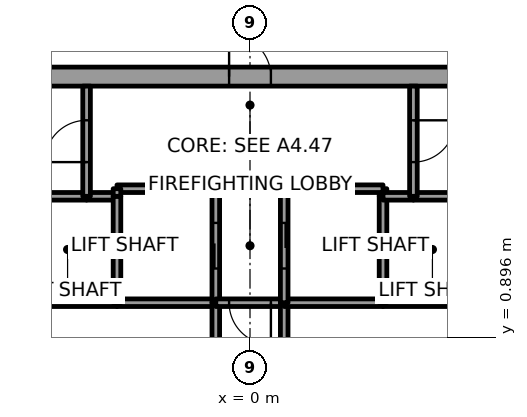
"""IFC4 building model, lengths in metres.
Left out: names, types, materials, properties, quantities, classifications, styles, units other than length and angle.
Written with IfcOpenShell. Run it as: python <this file> out.ifc"""

import sys

from ifc_helpers import new_model, si_unit, direction, frame, frame_2d, origin, place, context, subcontext, project, spatial, rectangle, extrude, element, fill, save


model = new_model("IFC4")
c1 = context("Model", 3, precision=1e-05, world=origin(), true_north=direction((0.0, 1.0)))
c2 = subcontext(c1, "Body", "Model", "MODEL_VIEW")
j1 = project(units=[si_unit("LENGTHUNIT", "METRE"), si_unit("PLANEANGLEUNIT", "RADIAN")], contexts=[c1])
p1 = place(None, origin())
s1 = spatial("IfcSite", under=j1, at=p1, CompositionType="ELEMENT")
p2 = place(p1, origin())
s2 = spatial("IfcBuilding", under=s1, at=p2, CompositionType="ELEMENT")
p3 = place(p2, frame((0.0, 0.0, 201.8)))
s3 = spatial("IfcBuildingStorey", under=s2, at=p3, CompositionType="ELEMENT", Elevation=201.8)
p4 = place(p3, frame((-11.0, 7.75, 0.0), z_axis=(0.0, 0.0, 1.0), x_axis=(1.0, 0.0, 0.0)))
e1 = element("IfcWall", 1, at=p4, inside=s3, PredefinedType="SHEAR", context=c2, shape_type="SweptSolid", body=[
    extrude(rectangle(XDim=22.0, YDim=0.5, at=frame_2d((11.0, 0.0))), origin(), (0.0, 0.0, 1.0), 4.0),
])
p5 = place(p4, frame((10.45, 0.0, 0.0)))
e2 = element("IfcOpeningElement", 2, at=p5, cuts=e1, PredefinedType="OPENING", context=c2, shape_type="SweptSolid", body=[
    extrude(rectangle(XDim=1.1, YDim=2.1, at=frame_2d((0.55, 1.05))), frame((0.0, 0.25, 0.0), z_axis=(0.0, -1.0, 0.0), x_axis=(1.0, 0.0, 0.0)), (0.0, 0.0, 1.0), 0.5),
])
p6 = place(p3, frame((-3.5, 1.8, 0.0), z_axis=(0.0, 0.0, 1.0), x_axis=(-1.0, 0.0, 0.0)))
e3 = element("IfcWall", 3, at=p6, inside=s3, PredefinedType="SOLIDWALL", context=c2, shape_type="SweptSolid", body=[
    extrude(rectangle(XDim=2.6, YDim=0.2, at=frame_2d((1.3, 0.0))), origin(), (0.0, 0.0, 1.0), 3.85),
])
p7 = place(p3, frame((-4.3, 4.6, 0.0), z_axis=(0.0, 0.0, 1.0), x_axis=(-1.0, 0.0, 0.0)))
e4 = element("IfcWall", 4, at=p7, inside=s3, PredefinedType="SOLIDWALL", context=c2, shape_type="SweptSolid", body=[
    extrude(rectangle(XDim=1.8, YDim=0.2, at=frame_2d((0.9, 0.0))), origin(), (0.0, 0.0, 1.0), 3.85),
])
p8 = place(p3, frame((-3.5, 4.6, 0.0), z_axis=(0.0, 0.0, 1.0), x_axis=(-1.0, 0.0, 0.0)))
e5 = element("IfcWall", 5, at=p8, inside=s3, PredefinedType="SOLIDWALL", context=c2, shape_type="SweptSolid", body=[
    extrude(rectangle(XDim=0.8, YDim=0.2, at=frame_2d((0.4, 0.0))), origin(), (0.0, 0.0, 1.0), 3.85),
])
p9 = place(p3, frame((-4.3, 4.6, 0.0), z_axis=(0.0, 0.0, 1.0), x_axis=(0.0, 1.0, 0.0)))
e6 = element("IfcWall", 6, at=p9, inside=s3, PredefinedType="SOLIDWALL", context=c2, shape_type="SweptSolid", body=[
    extrude(rectangle(XDim=2.9, YDim=0.2, at=frame_2d((1.45, 0.0))), origin(), (0.0, 0.0, 1.0), 3.85),
])
p10 = place(p9, frame((0.9, 0.0, 0.0)))
e7 = element("IfcOpeningElement", 7, at=p10, cuts=e6, PredefinedType="OPENING", context=c2, shape_type="SweptSolid", body=[
    extrude(rectangle(XDim=1.1, YDim=2.1, at=frame_2d((0.55, 1.05))), frame((0.0, 0.1, 0.0), z_axis=(0.0, -1.0, 0.0), x_axis=(1.0, 0.0, 0.0)), (0.0, 0.0, 1.0), 0.2),
])
p11 = place(p3, frame((-0.9, 1.8, 0.0), z_axis=(0.0, 0.0, 1.0), x_axis=(-1.0, 0.0, 0.0)))
e8 = element("IfcWall", 8, at=p11, inside=s3, PredefinedType="SOLIDWALL", context=c2, shape_type="SweptSolid", body=[
    extrude(rectangle(XDim=2.6, YDim=0.2, at=frame_2d((1.3, 0.0))), origin(), (0.0, 0.0, 1.0), 3.85),
])
p12 = place(p3, frame((-3.5, 4.6, 0.0), z_axis=(0.0, 0.0, 1.0), x_axis=(0.0, -1.0, 0.0)))
e9 = element("IfcWall", 9, at=p12, inside=s3, PredefinedType="SOLIDWALL", context=c2, shape_type="SweptSolid", body=[
    extrude(rectangle(XDim=2.8, YDim=0.2, at=frame_2d((1.4, 0.0))), origin(), (0.0, 0.0, 1.0), 3.85),
])
p13 = place(p3, frame((-0.9, 1.8, 0.0), z_axis=(0.0, 0.0, 1.0), x_axis=(0.0, 1.0, 0.0)))
e10 = element("IfcWall", 10, at=p13, inside=s3, PredefinedType="SOLIDWALL", context=c2, shape_type="SweptSolid", body=[
    extrude(rectangle(XDim=3.0, YDim=0.2, at=frame_2d((1.5, 0.0))), origin(), (0.0, 0.0, 1.0), 3.85),
])
p14 = place(p13, frame((0.9, 0.0, 0.0)))
e11 = element("IfcOpeningElement", 11, at=p14, cuts=e10, PredefinedType="OPENING", context=c2, shape_type="SweptSolid", body=[
    extrude(rectangle(XDim=1.2, YDim=2.1, at=frame_2d((0.6, 1.05))), frame((0.0, 0.1, 0.0), z_axis=(0.0, -1.0, 0.0), x_axis=(1.0, 0.0, 0.0)), (0.0, 0.0, 1.0), 0.2),
])
p15 = place(p3, frame((-0.9, 4.8, 0.0), z_axis=(0.0, 0.0, 1.0), x_axis=(-1.0, 0.0, 0.0)))
e12 = element("IfcWall", 12, at=p15, inside=s3, PredefinedType="SOLIDWALL", context=c2, shape_type="SweptSolid", body=[
    extrude(rectangle(XDim=2.6, YDim=0.2, at=frame_2d((1.3, 0.0))), origin(), (0.0, 0.0, 1.0), 3.85),
])
p16 = place(p3, frame((-3.5, 4.8, 0.0), z_axis=(0.0, 0.0, 1.0), x_axis=(0.0, -1.0, 0.0)))
e13 = element("IfcWall", 13, at=p16, inside=s3, PredefinedType="SOLIDWALL", context=c2, shape_type="SweptSolid", body=[
    extrude(rectangle(XDim=0.2, YDim=0.2, at=frame_2d((0.1, 0.0))), origin(), (0.0, 0.0, 1.0), 3.85),
])
p17 = place(p3, frame((-0.9, 1.8, 0.0), z_axis=(0.0, 0.0, 1.0), x_axis=(0.0, -1.0, 0.0)))
e14 = element("IfcWall", 14, at=p17, inside=s3, PredefinedType="SOLIDWALL", context=c2, shape_type="SweptSolid", body=[
    extrude(rectangle(XDim=3.6, YDim=0.2, at=frame_2d((1.8, 0.0))), origin(), (0.0, 0.0, 1.0), 3.85),
])
p18 = place(p17, frame((1.05, 0.0, 0.0)))
e15 = element("IfcOpeningElement", 15, at=p18, cuts=e14, PredefinedType="OPENING", context=c2, shape_type="SweptSolid", body=[
    extrude(rectangle(XDim=1.5, YDim=2.1, at=frame_2d((0.75, 1.05))), frame((0.0, 0.1, 0.0), z_axis=(0.0, -1.0, 0.0), x_axis=(1.0, 0.0, 0.0)), (0.0, 0.0, 1.0), 0.2),
])
p19 = place(p3, frame((0.9, 1.8, 0.0), z_axis=(0.0, 0.0, 1.0), x_axis=(-1.0, 0.0, 0.0)))
e16 = element("IfcWall", 16, at=p19, inside=s3, PredefinedType="SOLIDWALL", context=c2, shape_type="SweptSolid", body=[
    extrude(rectangle(XDim=1.8, YDim=0.2, at=frame_2d((0.9, 0.0))), origin(), (0.0, 0.0, 1.0), 3.85),
])
p20 = place(p19, frame((0.35, 0.0, 0.0)))
e17 = element("IfcOpeningElement", 17, at=p20, cuts=e16, PredefinedType="OPENING", context=c2, shape_type="SweptSolid", body=[
    extrude(rectangle(XDim=1.1, YDim=2.1, at=frame_2d((0.55, 1.05))), frame((0.0, 0.1, 0.0), z_axis=(0.0, -1.0, 0.0), x_axis=(1.0, 0.0, 0.0)), (0.0, 0.0, 1.0), 0.2),
])
p21 = place(p3, frame((0.9, -1.8, 0.0), z_axis=(0.0, 0.0, 1.0), x_axis=(0.0, 1.0, 0.0)))
e18 = element("IfcWall", 18, at=p21, inside=s3, PredefinedType="SOLIDWALL", context=c2, shape_type="SweptSolid", body=[
    extrude(rectangle(XDim=3.6, YDim=0.2, at=frame_2d((1.8, 0.0))), origin(), (0.0, 0.0, 1.0), 3.85),
])
p22 = place(p21, frame((1.05, 0.0, 0.0)))
e19 = element("IfcOpeningElement", 19, at=p22, cuts=e18, PredefinedType="OPENING", context=c2, shape_type="SweptSolid", body=[
    extrude(rectangle(XDim=1.5, YDim=2.1, at=frame_2d((0.75, 1.05))), frame((0.0, 0.1, 0.0), z_axis=(0.0, -1.0, 0.0), x_axis=(1.0, 0.0, 0.0)), (0.0, 0.0, 1.0), 0.2),
])
p23 = place(p3, frame((3.5, 1.8, 0.0), z_axis=(0.0, 0.0, 1.0), x_axis=(-1.0, 0.0, 0.0)))
e20 = element("IfcWall", 20, at=p23, inside=s3, PredefinedType="SOLIDWALL", context=c2, shape_type="SweptSolid", body=[
    extrude(rectangle(XDim=2.6, YDim=0.2, at=frame_2d((1.3, 0.0))), origin(), (0.0, 0.0, 1.0), 3.85),
])
p24 = place(p3, frame((3.5, 4.6, 0.0), z_axis=(0.0, 0.0, 1.0), x_axis=(0.0, 1.0, 0.0)))
e21 = element("IfcWall", 21, at=p24, inside=s3, PredefinedType="SOLIDWALL", context=c2, shape_type="SweptSolid", body=[
    extrude(rectangle(XDim=0.2, YDim=0.2, at=frame_2d((0.1, 0.0))), origin(), (0.0, 0.0, 1.0), 3.85),
])
p25 = place(p3, frame((3.5, 4.8, 0.0), z_axis=(0.0, 0.0, 1.0), x_axis=(-1.0, 0.0, 0.0)))
e22 = element("IfcWall", 22, at=p25, inside=s3, PredefinedType="SOLIDWALL", context=c2, shape_type="SweptSolid", body=[
    extrude(rectangle(XDim=2.6, YDim=0.2, at=frame_2d((1.3, 0.0))), origin(), (0.0, 0.0, 1.0), 3.85),
])
p26 = place(p3, frame((0.9, 4.8, 0.0), z_axis=(0.0, 0.0, 1.0), x_axis=(0.0, -1.0, 0.0)))
e23 = element("IfcWall", 23, at=p26, inside=s3, PredefinedType="SOLIDWALL", context=c2, shape_type="SweptSolid", body=[
    extrude(rectangle(XDim=3.0, YDim=0.2, at=frame_2d((1.5, 0.0))), origin(), (0.0, 0.0, 1.0), 3.85),
])
p27 = place(p26, frame((0.9, 0.0, 0.0)))
e24 = element("IfcOpeningElement", 24, at=p27, cuts=e23, PredefinedType="OPENING", context=c2, shape_type="SweptSolid", body=[
    extrude(rectangle(XDim=1.2, YDim=2.1, at=frame_2d((0.6, 1.05))), frame((0.0, 0.1, 0.0), z_axis=(0.0, -1.0, 0.0), x_axis=(1.0, 0.0, 0.0)), (0.0, 0.0, 1.0), 0.2),
])
p28 = place(p3, frame((6.1, 1.8, 0.0), z_axis=(0.0, 0.0, 1.0), x_axis=(-1.0, 0.0, 0.0)))
e25 = element("IfcWall", 25, at=p28, inside=s3, PredefinedType="SOLIDWALL", context=c2, shape_type="SweptSolid", body=[
    extrude(rectangle(XDim=2.6, YDim=0.2, at=frame_2d((1.3, 0.0))), origin(), (0.0, 0.0, 1.0), 3.85),
])
p29 = place(p3, frame((3.5, 1.8, 0.0), z_axis=(0.0, 0.0, 1.0), x_axis=(0.0, 1.0, 0.0)))
e26 = element("IfcWall", 26, at=p29, inside=s3, PredefinedType="SOLIDWALL", context=c2, shape_type="SweptSolid", body=[
    extrude(rectangle(XDim=2.8, YDim=0.2, at=frame_2d((1.4, 0.0))), origin(), (0.0, 0.0, 1.0), 3.85),
])
p30 = place(p3, frame((4.3, 4.6, 0.0), z_axis=(0.0, 0.0, 1.0), x_axis=(-1.0, 0.0, 0.0)))
e27 = element("IfcWall", 27, at=p30, inside=s3, PredefinedType="SOLIDWALL", context=c2, shape_type="SweptSolid", body=[
    extrude(rectangle(XDim=0.8, YDim=0.2, at=frame_2d((0.4, 0.0))), origin(), (0.0, 0.0, 1.0), 3.85),
])
p31 = place(p3, frame((6.1, 4.6, 0.0), z_axis=(0.0, 0.0, 1.0), x_axis=(-1.0, 0.0, 0.0)))
e28 = element("IfcWall", 28, at=p31, inside=s3, PredefinedType="SOLIDWALL", context=c2, shape_type="SweptSolid", body=[
    extrude(rectangle(XDim=1.8, YDim=0.2, at=frame_2d((0.9, 0.0))), origin(), (0.0, 0.0, 1.0), 3.85),
])
p32 = place(p3, frame((4.3, 7.5, 0.0), z_axis=(0.0, 0.0, 1.0), x_axis=(0.0, -1.0, 0.0)))
e29 = element("IfcWall", 29, at=p32, inside=s3, PredefinedType="SOLIDWALL", context=c2, shape_type="SweptSolid", body=[
    extrude(rectangle(XDim=2.9, YDim=0.2, at=frame_2d((1.45, 0.0))), origin(), (0.0, 0.0, 1.0), 3.85),
])
p33 = place(p32, frame((0.9, 0.0, 0.0)))
e30 = element("IfcOpeningElement", 30, at=p33, cuts=e29, PredefinedType="OPENING", context=c2, shape_type="SweptSolid", body=[
    extrude(rectangle(XDim=1.1, YDim=2.1, at=frame_2d((0.55, 1.05))), frame((0.0, 0.1, 0.0), z_axis=(0.0, -1.0, 0.0), x_axis=(1.0, 0.0, 0.0)), (0.0, 0.0, 1.0), 0.2),
])
p34 = place(p14, origin())
e31 = element("IfcDoor", 31, at=p34, inside=s3, OperationType="SLIDING_TO_LEFT", PredefinedType="DOOR", context=c2, shape_type="SweptSolid", body=[
    extrude(rectangle(XDim=1.2, YDim=2.1, at=frame_2d((0.6, 1.05))), frame((0.0, 0.025, 0.0), z_axis=(0.0, -1.0, 0.0), x_axis=(1.0, 0.0, 0.0)), (0.0, 0.0, 1.0), 0.05),
])
fill(e11, e31)
p35 = place(p27, origin())
e32 = element("IfcDoor", 32, at=p35, inside=s3, OperationType="SLIDING_TO_RIGHT", PredefinedType="DOOR", context=c2, shape_type="SweptSolid", body=[
    extrude(rectangle(XDim=1.2, YDim=2.1, at=frame_2d((0.6, 1.05))), frame((0.0, 0.025, 0.0), z_axis=(0.0, -1.0, 0.0), x_axis=(1.0, 0.0, 0.0)), (0.0, 0.0, 1.0), 0.05),
])
fill(e24, e32)
p36 = place(p20, origin())
e33 = element("IfcDoor", 33, at=p36, inside=s3, OperationType="SINGLE_SWING_RIGHT", PredefinedType="DOOR", context=c2, shape_type="SweptSolid", body=[
    extrude(rectangle(XDim=1.1, YDim=2.1, at=frame_2d((0.55, 1.05))), frame((0.0, 0.025, 0.0), z_axis=(0.0, -1.0, 0.0), x_axis=(1.0, 0.0, 0.0)), (0.0, 0.0, 1.0), 0.05),
])
fill(e17, e33)
p37 = place(p10, origin())
e34 = element("IfcDoor", 34, at=p37, inside=s3, OperationType="SINGLE_SWING_RIGHT", PredefinedType="DOOR", context=c2, shape_type="SweptSolid", body=[
    extrude(rectangle(XDim=1.1, YDim=2.1, at=frame_2d((0.55, 1.05))), frame((0.0, 0.025, 0.0), z_axis=(0.0, -1.0, 0.0), x_axis=(1.0, 0.0, 0.0)), (0.0, 0.0, 1.0), 0.05),
])
fill(e7, e34)
p38 = place(p33, origin())
e35 = element("IfcDoor", 35, at=p38, inside=s3, OperationType="SINGLE_SWING_RIGHT", PredefinedType="DOOR", context=c2, shape_type="SweptSolid", body=[
    extrude(rectangle(XDim=1.1, YDim=2.1, at=frame_2d((0.55, 1.05))), frame((0.0, 0.025, 0.0), z_axis=(0.0, -1.0, 0.0), x_axis=(1.0, 0.0, 0.0)), (0.0, 0.0, 1.0), 0.05),
])
fill(e30, e35)
p39 = place(p5, origin())
e36 = element("IfcDoor", 36, at=p39, inside=s3, OperationType="SINGLE_SWING_LEFT", PredefinedType="DOOR", context=c2, shape_type="SweptSolid", body=[
    extrude(rectangle(XDim=1.1, YDim=2.1, at=frame_2d((0.55, 1.05))), frame((0.0, 0.025, 0.0), z_axis=(0.0, -1.0, 0.0), x_axis=(1.0, 0.0, 0.0)), (0.0, 0.0, 1.0), 0.05),
])
fill(e2, e36)
save(model, sys.argv[1])
